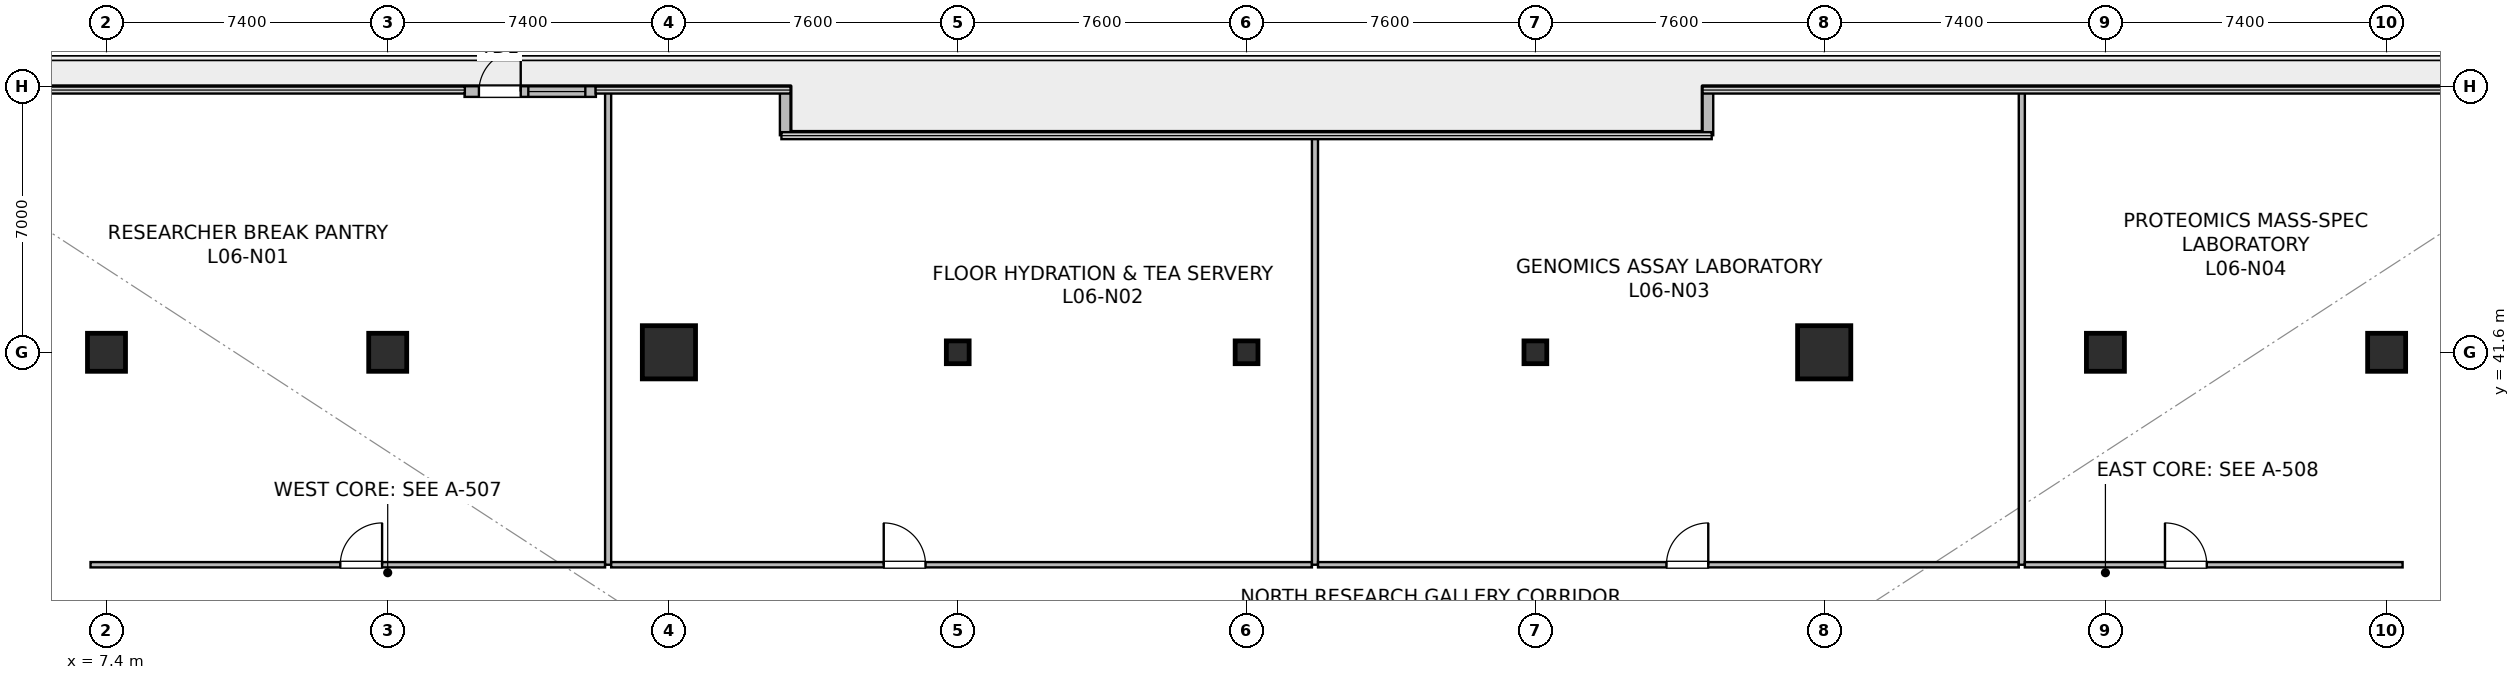
"""IFC4 building model, lengths in metres.
Left out: names, types, materials, properties, quantities, classifications, styles, units other than length and angle.
Written with IfcOpenShell. Run it as: python <this file> out.ifc"""

import sys

from ifc_helpers import new_model, si_unit, direction, frame, frame_2d, origin, origin_2d, place, context, subcontext, project, spatial, rectangle, hollow_rectangle, extrude, source, transform, mapped, element, fill, save


model = new_model("IFC4")
c1 = context("Model", 3, precision=1e-05, world=origin(), true_north=direction((0.0, 1.0)))
c2 = subcontext(c1, "Body", "Model", "MODEL_VIEW")
j1 = project(units=[si_unit("LENGTHUNIT", "METRE"), si_unit("PLANEANGLEUNIT", "RADIAN")], contexts=[c1])
p1 = place(None, origin())
s1 = spatial("IfcSite", under=j1, at=p1, CompositionType="ELEMENT")
p2 = place(p1, origin())
s2 = spatial("IfcBuilding", under=s1, at=p2, CompositionType="ELEMENT")
p3 = place(p2, frame((0.0, 0.0, 25.2)))
s3 = spatial("IfcBuildingStorey", under=s2, at=p3, CompositionType="ELEMENT", Elevation=25.2)
m1 = source(origin(), c2, "Body", "SweptSolid", [
    extrude(rectangle(XDim=1.0, YDim=1.0, at=origin_2d()), origin(), (0.0, 0.0, 1.0), 4.1),
])
p4 = place(p3, frame((14.8, 41.6, 0.0), z_axis=(0.0, 0.0, 1.0), x_axis=(1.0, 0.0, 0.0)))
e1 = element("IfcColumn", 1, at=p4, inside=s3, PredefinedType="COLUMN", context=c2, shape_type="MappedRepresentation", body=[
    mapped(m1, transform((0.0, 0.0, 0.0), scale=1.0)),
])
m2 = source(origin(), c2, "Body", "SweptSolid", [
    extrude(rectangle(XDim=1.4, YDim=1.4, at=origin_2d()), origin(), (0.0, 0.0, 1.0), 4.1),
])
for number, where, z_axis, x_axis in (
    (2, (22.2, 41.6, 0.0), (0.0, 0.0, 1.0), (1.0, 0.0, 0.0)),
    (3, (52.6, 41.6, 0.0), (0.0, 0.0, 1.0), (1.0, 0.0, 0.0)),
):
    element("IfcColumn", number, at=place(p3, frame(where, z_axis=z_axis, x_axis=x_axis)), inside=s3, PredefinedType="COLUMN", context=c2, shape_type="MappedRepresentation", body=[
        mapped(m2, transform((0.0, 0.0, 0.0), scale=1.0)),
    ])
for number, where, z_axis, x_axis in (
    (4, (60.0, 41.6, 0.0), (0.0, 0.0, 1.0), (1.0, 0.0, 0.0)),
    (5, (7.4, 41.6, 0.0), (0.0, 0.0, 1.0), (1.0, 0.0, 0.0)),
    (6, (67.4, 41.6, 0.0), (0.0, 0.0, 1.0), (1.0, 0.0, 0.0)),
):
    element("IfcColumn", number, at=place(p3, frame(where, z_axis=z_axis, x_axis=x_axis)), inside=s3, PredefinedType="COLUMN", context=c2, shape_type="MappedRepresentation", body=[
        mapped(m1, transform((0.0, 0.0, 0.0), scale=1.0)),
    ])
m3 = source(origin(), c2, "Body", "SweptSolid", [
    extrude(hollow_rectangle(XDim=0.6, YDim=0.6, WallThickness=0.028, at=origin_2d()), origin(), (0.0, 0.0, 1.0), 4.1),
])
for number, where, z_axis, x_axis in (
    (7, (29.8, 41.6, 0.0), (0.0, 0.0, 1.0), (1.0, 0.0, 0.0)),
    (8, (37.4, 41.6, 0.0), (0.0, 0.0, 1.0), (1.0, 0.0, 0.0)),
    (9, (45.0, 41.6, 0.0), (0.0, 0.0, 1.0), (1.0, 0.0, 0.0)),
):
    element("IfcColumn", number, at=place(p3, frame(where, z_axis=z_axis, x_axis=x_axis)), inside=s3, PredefinedType="COLUMN", context=c2, shape_type="MappedRepresentation", body=[
        mapped(m3, transform((0.0, 0.0, 0.0), scale=1.0)),
    ])
p5 = place(p3, frame((16.822, 48.46, 0.0), z_axis=(0.0, 0.0, 1.0), x_axis=(1.0, 0.0, 0.0)))
e10 = element("IfcWall", 10, at=p5, inside=s3, PredefinedType="STANDARD", context=c2, shape_type="SweptSolid", body=[
    extrude(rectangle(XDim=3.456, YDim=0.28, at=frame_2d((1.728, 0.0))), origin(), (0.0, 0.0, 1.0), 3.78),
])
p6 = place(p5, frame((0.378, 0.0, 0.0)))
e11 = element("IfcOpeningElement", 11, at=p6, cuts=e10, PredefinedType="OPENING", context=c2, shape_type="SweptSolid", body=[
    extrude(rectangle(XDim=1.1, YDim=2.2, at=frame_2d((0.55, 1.1))), frame((0.0, 0.15, 0.0), z_axis=(0.0, -1.0, 0.0), x_axis=(1.0, 0.0, 0.0)), (0.0, 0.0, 1.0), 0.3),
])
p7 = place(p5, frame((1.678, 0.0, 0.9)))
e12 = element("IfcOpeningElement", 12, at=p7, cuts=e10, PredefinedType="OPENING", context=c2, shape_type="SweptSolid", body=[
    extrude(rectangle(XDim=1.5, YDim=2.2, at=frame_2d((0.75, 1.1))), frame((0.0, 0.15, 0.0), z_axis=(0.0, -1.0, 0.0), x_axis=(1.0, 0.0, 0.0)), (0.0, 0.0, 1.0), 0.3),
])
for number, where, z_axis, x_axis in (
    (13, (49.54, 48.6, 0.0), (0.0, 0.0, 1.0), (0.0, -1.0, 0.0)),
    (14, (25.26, 47.312, 0.0), (0.0, 0.0, 1.0), (0.0, 1.0, 0.0)),
):
    element("IfcWall", number, at=place(p3, frame(where, z_axis=z_axis, x_axis=x_axis)), inside=s3, PredefinedType="STANDARD", context=c2, shape_type="SweptSolid", body=[
        extrude(rectangle(XDim=1.288, YDim=0.28, at=frame_2d((0.644, 0.0))), origin(), (0.0, 0.0, 1.0), 3.78),
    ])
p8 = place(p3, frame((6.98, 36.01, 0.0), z_axis=(0.0, 0.0, 1.0), x_axis=(1.0, 0.0, 0.0)))
e15 = element("IfcWall", 15, at=p8, inside=s3, PredefinedType="PARTITIONING", context=c2, shape_type="SweptSolid", body=[
    extrude(rectangle(XDim=13.54, YDim=0.14, at=frame_2d((6.77, 0.0))), origin(), (0.0, 0.0, 1.0), 3.065),
])
p9 = place(p8, frame((6.572, 0.0, 0.0)))
e16 = element("IfcOpeningElement", 16, at=p9, cuts=e15, PredefinedType="OPENING", context=c2, shape_type="SweptSolid", body=[
    extrude(rectangle(XDim=1.1, YDim=2.18, at=frame_2d((0.55, 1.09))), frame((0.0, 0.08, 0.0), z_axis=(0.0, -1.0, 0.0), x_axis=(1.0, 0.0, 0.0)), (0.0, 0.0, 1.0), 0.16),
])
p10 = place(p3, frame((20.6, 36.01, 0.0), z_axis=(0.0, 0.0, 1.0), x_axis=(0.0, 1.0, 0.0)))
e17 = element("IfcWall", 17, at=p10, inside=s3, PredefinedType="PARTITIONING", context=c2, shape_type="SweptSolid", body=[
    extrude(rectangle(XDim=12.48, YDim=0.16, at=frame_2d((6.24, 0.0))), origin(), (0.0, 0.0, 1.0), 3.015),
])
p11 = place(p3, frame((20.68, 36.01, 0.0), z_axis=(0.0, 0.0, 1.0), x_axis=(1.0, 0.0, 0.0)))
e18 = element("IfcWall", 18, at=p11, inside=s3, PredefinedType="PARTITIONING", context=c2, shape_type="SweptSolid", body=[
    extrude(rectangle(XDim=18.44, YDim=0.14, at=frame_2d((9.22, 0.0))), origin(), (0.0, 0.0, 1.0), 3.065),
])
p12 = place(p11, frame((7.172, 0.0, 0.0)))
e19 = element("IfcOpeningElement", 19, at=p12, cuts=e18, PredefinedType="OPENING", context=c2, shape_type="SweptSolid", body=[
    extrude(rectangle(XDim=1.1, YDim=2.18, at=frame_2d((0.55, 1.09))), frame((0.0, 0.08, 0.0), z_axis=(0.0, -1.0, 0.0), x_axis=(1.0, 0.0, 0.0)), (0.0, 0.0, 1.0), 0.16),
])
p13 = place(p3, frame((39.2, 36.01, 0.0), z_axis=(0.0, 0.0, 1.0), x_axis=(0.0, 1.0, 0.0)))
e20 = element("IfcWall", 20, at=p13, inside=s3, PredefinedType="PARTITIONING", context=c2, shape_type="SweptSolid", body=[
    extrude(rectangle(XDim=11.28, YDim=0.16, at=frame_2d((5.64, 0.0))), origin(), (0.0, 0.0, 1.0), 3.015),
])
p14 = place(p3, frame((39.28, 36.01, 0.0), z_axis=(0.0, 0.0, 1.0), x_axis=(1.0, 0.0, 0.0)))
e21 = element("IfcWall", 21, at=p14, inside=s3, PredefinedType="PARTITIONING", context=c2, shape_type="SweptSolid", body=[
    extrude(rectangle(XDim=18.44, YDim=0.14, at=frame_2d((9.22, 0.0))), origin(), (0.0, 0.0, 1.0), 3.065),
])
p15 = place(p14, frame((9.169, 0.0, 0.0)))
e22 = element("IfcOpeningElement", 22, at=p15, cuts=e21, PredefinedType="OPENING", context=c2, shape_type="SweptSolid", body=[
    extrude(rectangle(XDim=1.1, YDim=2.18, at=frame_2d((0.55, 1.09))), frame((0.0, 0.08, 0.0), z_axis=(0.0, -1.0, 0.0), x_axis=(1.0, 0.0, 0.0)), (0.0, 0.0, 1.0), 0.16),
])
p16 = place(p3, frame((57.8, 36.01, 0.0), z_axis=(0.0, 0.0, 1.0), x_axis=(0.0, 1.0, 0.0)))
e23 = element("IfcWall", 23, at=p16, inside=s3, PredefinedType="PARTITIONING", context=c2, shape_type="SweptSolid", body=[
    extrude(rectangle(XDim=12.48, YDim=0.16, at=frame_2d((6.24, 0.0))), origin(), (0.0, 0.0, 1.0), 3.015),
])
p17 = place(p3, frame((57.88, 36.01, 0.0), z_axis=(0.0, 0.0, 1.0), x_axis=(1.0, 0.0, 0.0)))
e24 = element("IfcWall", 24, at=p17, inside=s3, PredefinedType="PARTITIONING", context=c2, shape_type="SweptSolid", body=[
    extrude(rectangle(XDim=9.94, YDim=0.14, at=frame_2d((4.97, 0.0))), origin(), (0.0, 0.0, 1.0), 3.065),
])
p18 = place(p17, frame((3.688, 0.0, 0.0)))
e25 = element("IfcOpeningElement", 25, at=p18, cuts=e24, PredefinedType="OPENING", context=c2, shape_type="SweptSolid", body=[
    extrude(rectangle(XDim=1.1, YDim=2.18, at=frame_2d((0.55, 1.09))), frame((0.0, 0.08, 0.0), z_axis=(0.0, -1.0, 0.0), x_axis=(1.0, 0.0, 0.0)), (0.0, 0.0, 1.0), 0.16),
])
m4 = source(origin(), c2, "Body", "SweptSolid", [
    extrude(rectangle(XDim=1.1, YDim=2.2, at=frame_2d((0.55, 1.1))), frame((0.0, 0.025, 0.0), z_axis=(0.0, -1.0, 0.0), x_axis=(1.0, 0.0, 0.0)), (0.0, 0.0, 1.0), 0.05),
])
p19 = place(p6, origin())
e26 = element("IfcDoor", 26, at=p19, inside=s3, OperationType="SINGLE_SWING_RIGHT", PredefinedType="DOOR", context=c2, shape_type="MappedRepresentation", body=[
    mapped(m4, transform((0.0, 0.0, 0.0), scale=1.0)),
])
fill(e11, e26)
m5 = source(origin(), c2, "Body", "SweptSolid", [
    extrude(rectangle(XDim=1.5, YDim=2.2, at=frame_2d((0.75, 1.1))), frame((0.0, 0.03, 0.0), z_axis=(0.0, -1.0, 0.0), x_axis=(1.0, 0.0, 0.0)), (0.0, 0.0, 1.0), 0.06),
])
p20 = place(p7, origin())
e27 = element("IfcWindow", 27, at=p20, inside=s3, PartitioningType="SINGLE_PANEL", PredefinedType="WINDOW", context=c2, shape_type="MappedRepresentation", body=[
    mapped(m5, transform((0.0, 0.0, 0.0), scale=1.0)),
])
fill(e12, e27)
m6 = source(origin(), c2, "Body", "SweptSolid", [
    extrude(rectangle(XDim=1.1, YDim=2.18, at=frame_2d((0.55, 1.09))), frame((0.0, 0.025, 0.0), z_axis=(0.0, -1.0, 0.0), x_axis=(1.0, 0.0, 0.0)), (0.0, 0.0, 1.0), 0.05),
])
p21 = place(p9, origin())
e28 = element("IfcDoor", 28, at=p21, inside=s3, OperationType="SINGLE_SWING_RIGHT", PredefinedType="DOOR", context=c2, shape_type="MappedRepresentation", body=[
    mapped(m6, transform((0.0, 0.0, 0.0), scale=1.0)),
])
fill(e16, e28)
p22 = place(p12, origin())
e29 = element("IfcDoor", 29, at=p22, inside=s3, OperationType="SINGLE_SWING_LEFT", PredefinedType="DOOR", context=c2, shape_type="MappedRepresentation", body=[
    mapped(m6, transform((0.0, 0.0, 0.0), scale=1.0)),
])
fill(e19, e29)
p23 = place(p15, origin())
e30 = element("IfcDoor", 30, at=p23, inside=s3, OperationType="SINGLE_SWING_RIGHT", PredefinedType="DOOR", context=c2, shape_type="MappedRepresentation", body=[
    mapped(m6, transform((0.0, 0.0, 0.0), scale=1.0)),
])
fill(e22, e30)
p24 = place(p18, origin())
e31 = element("IfcDoor", 31, at=p24, inside=s3, OperationType="SINGLE_SWING_LEFT", PredefinedType="DOOR", context=c2, shape_type="MappedRepresentation", body=[
    mapped(m6, transform((0.0, 0.0, 0.0), scale=1.0)),
])
fill(e25, e31)
save(model, sys.argv[1])
